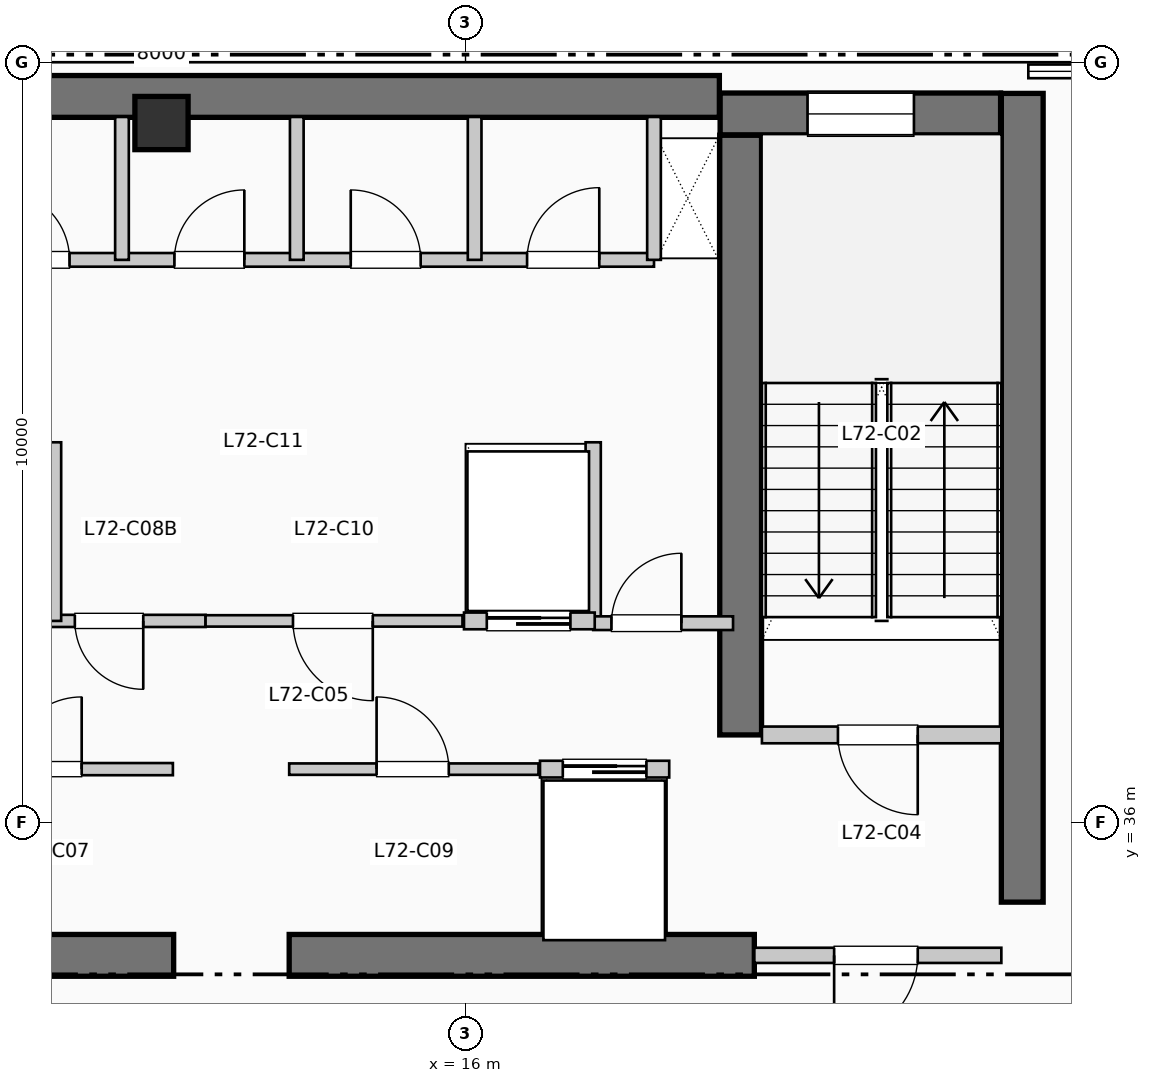
"""IFC4 building model, lengths in metres.
Left out: names, types, materials, properties, quantities, classifications, styles, units other than length and angle.
Written with IfcOpenShell. Run it as: python <this file> out.ifc"""

import sys

from ifc_helpers import new_model, si_unit, direction, frame, frame_2d, origin, origin_2d, place, context, subcontext, project, spatial, rectangle, extrude, element, fill, save


model = new_model("IFC4")
c1 = context("Model", 3, precision=1e-05, world=origin(), true_north=direction((0.0, 1.0)))
c2 = subcontext(c1, "Body", "Model", "MODEL_VIEW")
j1 = project(units=[si_unit("LENGTHUNIT", "METRE"), si_unit("PLANEANGLEUNIT", "RADIAN")], contexts=[c1])
p1 = place(None, origin())
s1 = spatial("IfcSite", under=j1, at=p1, CompositionType="ELEMENT")
p2 = place(p1, origin())
s2 = spatial("IfcBuilding", under=s1, at=p2, CompositionType="ELEMENT")
p3 = place(p2, frame((0.0, 0.0, 296.01)))
s3 = spatial("IfcBuildingStorey", under=s2, at=p3, CompositionType="ELEMENT", Elevation=296.01)
p4 = place(p3, frame((5.36, 45.55, 0.0), z_axis=(0.0, 0.0, 1.0), x_axis=(1.0, 0.0, 0.0)))
e1 = element("IfcWall", 1, at=p4, inside=s3, PredefinedType="SHEAR", context=c2, shape_type="SweptSolid", body=[
    extrude(rectangle(XDim=13.98, YDim=0.55, at=frame_2d((6.99, 0.0))), origin(), (0.0, 0.0, 1.0), 3.96),
])
p5 = place(p3, frame((23.325, 34.95, 0.0), z_axis=(0.0, 0.0, 1.0), x_axis=(0.0, 1.0, 0.0)))
e2 = element("IfcWall", 2, at=p5, inside=s3, PredefinedType="SHEAR", context=c2, shape_type="SweptSolid", body=[
    extrude(rectangle(XDim=10.64, YDim=0.55, at=frame_2d((5.32, 0.0))), origin(), (0.0, 0.0, 1.0), 3.96),
])
p6 = place(p3, frame((1.45, 34.25, 0.0), z_axis=(0.0, 0.0, 1.0), x_axis=(1.0, 0.0, 0.0)))
e3 = element("IfcWall", 3, at=p6, inside=s3, PredefinedType="SHEAR", context=c2, shape_type="SweptSolid", body=[
    extrude(rectangle(XDim=10.71, YDim=0.55, at=frame_2d((5.355, 0.0))), origin(), (0.0, 0.0, 1.0), 3.96),
])
p7 = place(p6, frame((7.25, 0.0, 0.0), z_axis=(0.0, 0.0, 1.0), x_axis=(-1.0, 0.0, 0.0)))
e4 = element("IfcOpeningElement", 4, at=p7, cuts=e3, PredefinedType="OPENING", context=c2, shape_type="SweptSolid", body=[
    extrude(rectangle(XDim=1.1, YDim=2.15, at=frame_2d((0.55, 1.075))), frame((0.0, 0.285, 0.0), z_axis=(0.0, -1.0, 0.0), x_axis=(1.0, 0.0, 0.0)), (0.0, 0.0, 1.0), 0.57),
])
p8 = place(p3, frame((13.68, 34.25, 0.0), z_axis=(0.0, 0.0, 1.0), x_axis=(1.0, 0.0, 0.0)))
e5 = element("IfcWall", 5, at=p8, inside=s3, PredefinedType="SHEAR", context=c2, shape_type="SweptSolid", body=[
    extrude(rectangle(XDim=6.12, YDim=0.55, at=frame_2d((3.06, 0.0))), origin(), (0.0, 0.0, 1.0), 3.96),
])
p9 = place(p3, frame((19.62, 37.15, 0.0), z_axis=(0.0, 0.0, 1.0), x_axis=(0.0, 1.0, 0.0)))
e6 = element("IfcWall", 6, at=p9, inside=s3, PredefinedType="SHEAR", context=c2, shape_type="SweptSolid", body=[
    extrude(rectangle(XDim=7.89, YDim=0.55, at=frame_2d((3.945, 0.0))), origin(), (0.0, 0.0, 1.0), 3.96),
])
p10 = place(p3, frame((19.35, 45.32, 0.0), z_axis=(0.0, 0.0, 1.0), x_axis=(1.0, 0.0, 0.0)))
e7 = element("IfcWall", 7, at=p10, inside=s3, PredefinedType="SHEAR", context=c2, shape_type="SweptSolid", body=[
    extrude(rectangle(XDim=3.69, YDim=0.55, at=frame_2d((1.845, 0.0))), origin(), (0.0, 0.0, 1.0), 3.96),
])
p11 = place(p10, frame((1.15, 0.0, 1.05)))
e8 = element("IfcOpeningElement", 8, at=p11, cuts=e7, PredefinedType="OPENING", context=c2, shape_type="SweptSolid", body=[
    extrude(rectangle(XDim=1.4, YDim=1.8, at=frame_2d((0.7, 0.9))), frame((0.0, 0.285, 0.0), z_axis=(0.0, -1.0, 0.0), x_axis=(1.0, 0.0, 0.0)), (0.0, 0.0, 1.0), 0.57),
])
p12 = place(p3, frame((12.0, 45.2, 0.0), z_axis=(0.0, 0.0, 1.0), x_axis=(1.0, 0.0, 0.0)))
e9 = element("IfcColumn", 9, at=p12, inside=s3, PredefinedType="COLUMN", context=c2, shape_type="SweptSolid", body=[
    extrude(rectangle(XDim=0.7, YDim=0.7, at=origin_2d()), origin(), (0.0, 0.0, 1.0), 3.96),
])
p13 = place(p3, frame((19.9, 37.15, 0.0), z_axis=(0.0, 0.0, 1.0), x_axis=(1.0, 0.0, 0.0)))
e10 = element("IfcWall", 10, at=p13, inside=s3, PredefinedType="PARTITIONING", context=c2, shape_type="SweptSolid", body=[
    extrude(rectangle(XDim=3.15, YDim=0.22, at=frame_2d((1.575, 0.0))), origin(), (0.0, 0.0, 1.0), 3.74),
])
p14 = place(p13, frame((2.05, 0.0, 0.0), z_axis=(0.0, 0.0, 1.0), x_axis=(-1.0, 0.0, 0.0)))
e11 = element("IfcOpeningElement", 11, at=p14, cuts=e10, PredefinedType="OPENING", context=c2, shape_type="SweptSolid", body=[
    extrude(rectangle(XDim=1.05, YDim=2.15, at=frame_2d((0.525, 1.075))), frame((0.0, 0.12, 0.0), z_axis=(0.0, -1.0, 0.0), x_axis=(1.0, 0.0, 0.0)), (0.0, 0.0, 1.0), 0.24),
])
p15 = place(p3, frame((19.8, 34.25, 0.0), z_axis=(0.0, 0.0, 1.0), x_axis=(1.0, 0.0, 0.0)))
e12 = element("IfcWall", 12, at=p15, inside=s3, PredefinedType="PARTITIONING", context=c2, shape_type="SweptSolid", body=[
    extrude(rectangle(XDim=3.25, YDim=0.2, at=frame_2d((1.625, 0.0))), origin(), (0.0, 0.0, 1.0), 3.74),
])
p16 = place(p15, frame((2.15, 0.0, 0.0), z_axis=(0.0, 0.0, 1.0), x_axis=(-1.0, 0.0, 0.0)))
e13 = element("IfcOpeningElement", 13, at=p16, cuts=e12, PredefinedType="OPENING", context=c2, shape_type="SweptSolid", body=[
    extrude(rectangle(XDim=1.1, YDim=2.15, at=frame_2d((0.55, 1.075))), frame((0.0, 0.11, 0.0), z_axis=(0.0, -1.0, 0.0), x_axis=(1.0, 0.0, 0.0)), (0.0, 0.0, 1.0), 0.22),
])
p17 = place(p3, frame((17.68, 38.65, 0.0), z_axis=(0.0, 0.0, 1.0), x_axis=(0.0, 1.0, 0.0)))
e14 = element("IfcWall", 14, at=p17, inside=s3, PredefinedType="PARTITIONING", context=c2, shape_type="SweptSolid", body=[
    extrude(rectangle(XDim=2.35, YDim=0.2, at=frame_2d((1.175, 0.0))), origin(), (0.0, 0.0, 1.0), 3.74),
])
p18 = place(p3, frame((17.68, 38.62, 0.0), z_axis=(0.0, 0.0, 1.0), x_axis=(1.0, 0.0, 0.0)))
e15 = element("IfcWall", 15, at=p18, inside=s3, PredefinedType="PARTITIONING", context=c2, shape_type="SweptSolid", body=[
    extrude(rectangle(XDim=1.84, YDim=0.18, at=frame_2d((0.92, 0.0))), origin(), (0.0, 0.0, 1.0), 3.74),
])
p19 = place(p18, frame((0.24, 0.0, 0.0)))
e16 = element("IfcOpeningElement", 16, at=p19, cuts=e15, PredefinedType="OPENING", context=c2, shape_type="SweptSolid", body=[
    extrude(rectangle(XDim=0.92, YDim=2.1, at=frame_2d((0.46, 1.05))), frame((0.0, 0.1, 0.0), z_axis=(0.0, -1.0, 0.0), x_axis=(1.0, 0.0, 0.0)), (0.0, 0.0, 1.0), 0.2),
])
p20 = place(p3, frame((8.9, 36.7, 0.0), z_axis=(0.0, 0.0, 1.0), x_axis=(1.0, 0.0, 0.0)))
e17 = element("IfcWall", 17, at=p20, inside=s3, PredefinedType="PARTITIONING", context=c2, shape_type="SweptSolid", body=[
    extrude(rectangle(XDim=3.25, YDim=0.16, at=frame_2d((1.625, 0.0))), origin(), (0.0, 0.0, 1.0), 3.74),
])
p21 = place(p20, frame((1.1, 0.0, 0.0)))
e18 = element("IfcOpeningElement", 18, at=p21, cuts=e17, PredefinedType="OPENING", context=c2, shape_type="SweptSolid", body=[
    extrude(rectangle(XDim=0.95, YDim=2.15, at=frame_2d((0.475, 1.075))), frame((0.0, 0.09, 0.0), z_axis=(0.0, -1.0, 0.0), x_axis=(1.0, 0.0, 0.0)), (0.0, 0.0, 1.0), 0.18),
])
p22 = place(p3, frame((9.16, 38.65, 0.0), z_axis=(0.0, 0.0, 1.0), x_axis=(1.0, 0.0, 0.0)))
e19 = element("IfcWall", 19, at=p22, inside=s3, PredefinedType="PARTITIONING", context=c2, shape_type="SweptSolid", body=[
    extrude(rectangle(XDim=3.42, YDim=0.16, at=frame_2d((1.71, 0.0))), origin(), (0.0, 0.0, 1.0), 3.74),
])
p23 = place(p22, frame((1.18, 0.0, 0.0), z_axis=(0.0, 0.0, 1.0), x_axis=(-1.0, 0.0, 0.0)))
e20 = element("IfcOpeningElement", 20, at=p23, cuts=e19, PredefinedType="OPENING", context=c2, shape_type="SweptSolid", body=[
    extrude(rectangle(XDim=0.9, YDim=2.15, at=frame_2d((0.45, 1.075))), frame((0.0, 0.09, 0.0), z_axis=(0.0, -1.0, 0.0), x_axis=(1.0, 0.0, 0.0)), (0.0, 0.0, 1.0), 0.18),
])
p24 = place(p22, frame((2.6, 0.0, 0.0), z_axis=(0.0, 0.0, 1.0), x_axis=(-1.0, 0.0, 0.0)))
e21 = element("IfcOpeningElement", 21, at=p24, cuts=e19, PredefinedType="OPENING", context=c2, shape_type="SweptSolid", body=[
    extrude(rectangle(XDim=0.9, YDim=2.15, at=frame_2d((0.45, 1.075))), frame((0.0, 0.09, 0.0), z_axis=(0.0, -1.0, 0.0), x_axis=(1.0, 0.0, 0.0)), (0.0, 0.0, 1.0), 0.18),
])
p25 = place(p3, frame((10.6, 38.65, 0.0), z_axis=(0.0, 0.0, 1.0), x_axis=(0.0, 1.0, 0.0)))
e22 = element("IfcWall", 22, at=p25, inside=s3, PredefinedType="PARTITIONING", context=c2, shape_type="SweptSolid", body=[
    extrude(rectangle(XDim=2.35, YDim=0.16, at=frame_2d((1.175, 0.0))), origin(), (0.0, 0.0, 1.0), 3.74),
])
p26 = place(p3, frame((13.68, 36.7, 0.0), z_axis=(0.0, 0.0, 1.0), x_axis=(1.0, 0.0, 0.0)))
e23 = element("IfcWall", 23, at=p26, inside=s3, PredefinedType="PARTITIONING", context=c2, shape_type="SweptSolid", body=[
    extrude(rectangle(XDim=3.28, YDim=0.15, at=frame_2d((1.64, 0.0))), origin(), (0.0, 0.0, 1.0), 3.74),
])
p27 = place(p26, frame((1.15, 0.0, 0.0)))
e24 = element("IfcOpeningElement", 24, at=p27, cuts=e23, PredefinedType="OPENING", context=c2, shape_type="SweptSolid", body=[
    extrude(rectangle(XDim=0.95, YDim=2.15, at=frame_2d((0.475, 1.075))), frame((0.0, 0.085, 0.0), z_axis=(0.0, -1.0, 0.0), x_axis=(1.0, 0.0, 0.0)), (0.0, 0.0, 1.0), 0.17),
])
p28 = place(p3, frame((12.58, 38.65, 0.0), z_axis=(0.0, 0.0, 1.0), x_axis=(1.0, 0.0, 0.0)))
e25 = element("IfcWall", 25, at=p28, inside=s3, PredefinedType="PARTITIONING", context=c2, shape_type="SweptSolid", body=[
    extrude(rectangle(XDim=3.38, YDim=0.15, at=frame_2d((1.69, 0.0))), origin(), (0.0, 0.0, 1.0), 3.74),
])
p29 = place(p28, frame((2.2, 0.0, 0.0), z_axis=(0.0, 0.0, 1.0), x_axis=(-1.0, 0.0, 0.0)))
e26 = element("IfcOpeningElement", 26, at=p29, cuts=e25, PredefinedType="OPENING", context=c2, shape_type="SweptSolid", body=[
    extrude(rectangle(XDim=1.05, YDim=2.15, at=frame_2d((0.525, 1.075))), frame((0.0, 0.085, 0.0), z_axis=(0.0, -1.0, 0.0), x_axis=(1.0, 0.0, 0.0)), (0.0, 0.0, 1.0), 0.17),
])
p30 = place(p3, frame((16.98, 36.7, 0.0), z_axis=(0.0, 0.0, 1.0), x_axis=(1.0, 0.0, 0.0)))
e27 = element("IfcWall", 27, at=p30, inside=s3, PredefinedType="PARTITIONING", context=c2, shape_type="SweptSolid", body=[
    extrude(rectangle(XDim=1.7, YDim=0.22, at=frame_2d((0.85, 0.0))), origin(), (0.0, 0.0, 1.0), 3.74),
])
p31 = place(p30, frame((0.3, 0.0, 0.0)))
e28 = element("IfcOpeningElement", 28, at=p31, cuts=e27, PredefinedType="OPENING", context=c2, shape_type="SweptSolid", body=[
    extrude(rectangle(XDim=1.1, YDim=2.2, at=frame_2d((0.55, 1.1))), frame((0.0, 0.12, 0.0), z_axis=(0.0, -1.0, 0.0), x_axis=(1.0, 0.0, 0.0)), (0.0, 0.0, 1.0), 0.24),
])
p32 = place(p3, frame((15.98, 38.65, 0.0), z_axis=(0.0, 0.0, 1.0), x_axis=(1.0, 0.0, 0.0)))
e29 = element("IfcWall", 29, at=p32, inside=s3, PredefinedType="PARTITIONING", context=c2, shape_type="SweptSolid", body=[
    extrude(rectangle(XDim=1.72, YDim=0.22, at=frame_2d((0.86, 0.0))), origin(), (0.0, 0.0, 1.0), 3.74),
])
p33 = place(p32, frame((0.3, 0.0, 0.0)))
e30 = element("IfcOpeningElement", 30, at=p33, cuts=e29, PredefinedType="OPENING", context=c2, shape_type="SweptSolid", body=[
    extrude(rectangle(XDim=1.1, YDim=2.2, at=frame_2d((0.55, 1.1))), frame((0.0, 0.12, 0.0), z_axis=(0.0, -1.0, 0.0), x_axis=(1.0, 0.0, 0.0)), (0.0, 0.0, 1.0), 0.24),
])
p34 = place(p3, frame((9.15, 43.4, 0.0), z_axis=(0.0, 0.0, 1.0), x_axis=(1.0, 0.0, 0.0)))
e31 = element("IfcWall", 31, at=p34, inside=s3, PredefinedType="PLUMBINGWALL", context=c2, shape_type="SweptSolid", body=[
    extrude(rectangle(XDim=9.33, YDim=0.18, at=frame_2d((4.665, 0.0))), origin(), (0.0, 0.0, 1.0), 3.74),
])
p35 = place(p34, frame((0.72, 0.0, 0.0)))
e32 = element("IfcOpeningElement", 32, at=p35, cuts=e31, PredefinedType="OPENING", context=c2, shape_type="SweptSolid", body=[
    extrude(rectangle(XDim=0.92, YDim=2.1, at=frame_2d((0.46, 1.05))), frame((0.0, 0.1, 0.0), z_axis=(0.0, -1.0, 0.0), x_axis=(1.0, 0.0, 0.0)), (0.0, 0.0, 1.0), 0.2),
])
p36 = place(p34, frame((3.02, 0.0, 0.0)))
e33 = element("IfcOpeningElement", 33, at=p36, cuts=e31, PredefinedType="OPENING", context=c2, shape_type="SweptSolid", body=[
    extrude(rectangle(XDim=0.92, YDim=2.1, at=frame_2d((0.46, 1.05))), frame((0.0, 0.1, 0.0), z_axis=(0.0, -1.0, 0.0), x_axis=(1.0, 0.0, 0.0)), (0.0, 0.0, 1.0), 0.2),
])
p37 = place(p34, frame((5.34, 0.0, 0.0)))
e34 = element("IfcOpeningElement", 34, at=p37, cuts=e31, PredefinedType="OPENING", context=c2, shape_type="SweptSolid", body=[
    extrude(rectangle(XDim=0.92, YDim=2.1, at=frame_2d((0.46, 1.05))), frame((0.0, 0.1, 0.0), z_axis=(0.0, -1.0, 0.0), x_axis=(1.0, 0.0, 0.0)), (0.0, 0.0, 1.0), 0.2),
])
p38 = place(p34, frame((7.66, 0.0, 0.0)))
e35 = element("IfcOpeningElement", 35, at=p38, cuts=e31, PredefinedType="OPENING", context=c2, shape_type="SweptSolid", body=[
    extrude(rectangle(XDim=0.95, YDim=2.1, at=frame_2d((0.475, 1.05))), frame((0.0, 0.1, 0.0), z_axis=(0.0, -1.0, 0.0), x_axis=(1.0, 0.0, 0.0)), (0.0, 0.0, 1.0), 0.2),
])
for number, where, z_axis, x_axis in (
    (36, (18.48, 43.4, 0.0), (0.0, 0.0, 1.0), (0.0, 1.0, 0.0)),
    (37, (11.48, 43.4, 0.0), (0.0, 0.0, 1.0), (0.0, 1.0, 0.0)),
    (38, (13.78, 43.4, 0.0), (0.0, 0.0, 1.0), (0.0, 1.0, 0.0)),
    (39, (16.12, 43.4, 0.0), (0.0, 0.0, 1.0), (0.0, 1.0, 0.0)),
):
    element("IfcWall", number, at=place(p3, frame(where, z_axis=z_axis, x_axis=x_axis)), inside=s3, PredefinedType="PLUMBINGWALL", context=c2, shape_type="SweptSolid", body=[
        extrude(rectangle(XDim=1.88, YDim=0.18, at=frame_2d((0.94, 0.0))), origin(), (0.0, 0.0, 1.0), 3.74),
    ])
p39 = place(p11, origin())
e40 = element("IfcWindow", 40, at=p39, inside=s3, PartitioningType="SINGLE_PANEL", PredefinedType="WINDOW", context=c2, shape_type="SweptSolid", body=[
    extrude(rectangle(XDim=1.4, YDim=1.8, at=frame_2d((0.7, 0.9))), frame((0.0, 0.03, 0.0), z_axis=(0.0, -1.0, 0.0), x_axis=(1.0, 0.0, 0.0)), (0.0, 0.0, 1.0), 0.06),
])
fill(e8, e40)
p40 = place(p14, origin())
e41 = element("IfcDoor", 41, at=p40, inside=s3, OperationType="SINGLE_SWING_RIGHT", PredefinedType="DOOR", context=c2, shape_type="SweptSolid", body=[
    extrude(rectangle(XDim=1.05, YDim=2.15, at=frame_2d((0.525, 1.075))), frame((0.0, 0.025, 0.0), z_axis=(0.0, -1.0, 0.0), x_axis=(1.0, 0.0, 0.0)), (0.0, 0.0, 1.0), 0.05),
])
fill(e11, e41)
p41 = place(p16, origin())
e42 = element("IfcDoor", 42, at=p41, inside=s3, OperationType="SINGLE_SWING_LEFT", PredefinedType="DOOR", context=c2, shape_type="SweptSolid", body=[
    extrude(rectangle(XDim=1.1, YDim=2.15, at=frame_2d((0.55, 1.075))), frame((0.0, 0.025, 0.0), z_axis=(0.0, -1.0, 0.0), x_axis=(1.0, 0.0, 0.0)), (0.0, 0.0, 1.0), 0.05),
])
fill(e13, e42)
p42 = place(p19, origin())
e43 = element("IfcDoor", 43, at=p42, inside=s3, OperationType="SINGLE_SWING_RIGHT", PredefinedType="DOOR", context=c2, shape_type="SweptSolid", body=[
    extrude(rectangle(XDim=0.92, YDim=2.1, at=frame_2d((0.46, 1.05))), frame((0.0, 0.025, 0.0), z_axis=(0.0, -1.0, 0.0), x_axis=(1.0, 0.0, 0.0)), (0.0, 0.0, 1.0), 0.05),
])
fill(e16, e43)
p43 = place(p21, origin())
e44 = element("IfcDoor", 44, at=p43, inside=s3, OperationType="SINGLE_SWING_RIGHT", PredefinedType="DOOR", context=c2, shape_type="SweptSolid", body=[
    extrude(rectangle(XDim=0.95, YDim=2.15, at=frame_2d((0.475, 1.075))), frame((0.0, 0.025, 0.0), z_axis=(0.0, -1.0, 0.0), x_axis=(1.0, 0.0, 0.0)), (0.0, 0.0, 1.0), 0.05),
])
fill(e18, e44)
p44 = place(p24, origin())
e45 = element("IfcDoor", 45, at=p44, inside=s3, OperationType="SINGLE_SWING_RIGHT", PredefinedType="DOOR", context=c2, shape_type="SweptSolid", body=[
    extrude(rectangle(XDim=0.9, YDim=2.15, at=frame_2d((0.45, 1.075))), frame((0.0, 0.025, 0.0), z_axis=(0.0, -1.0, 0.0), x_axis=(1.0, 0.0, 0.0)), (0.0, 0.0, 1.0), 0.05),
])
fill(e21, e45)
p45 = place(p27, origin())
e46 = element("IfcDoor", 46, at=p45, inside=s3, OperationType="SINGLE_SWING_LEFT", PredefinedType="DOOR", context=c2, shape_type="SweptSolid", body=[
    extrude(rectangle(XDim=0.95, YDim=2.15, at=frame_2d((0.475, 1.075))), frame((0.0, 0.025, 0.0), z_axis=(0.0, -1.0, 0.0), x_axis=(1.0, 0.0, 0.0)), (0.0, 0.0, 1.0), 0.05),
])
fill(e24, e46)
p46 = place(p29, origin())
e47 = element("IfcDoor", 47, at=p46, inside=s3, OperationType="SINGLE_SWING_RIGHT", PredefinedType="DOOR", context=c2, shape_type="SweptSolid", body=[
    extrude(rectangle(XDim=1.05, YDim=2.15, at=frame_2d((0.525, 1.075))), frame((0.0, 0.025, 0.0), z_axis=(0.0, -1.0, 0.0), x_axis=(1.0, 0.0, 0.0)), (0.0, 0.0, 1.0), 0.05),
])
fill(e26, e47)
p47 = place(p31, origin())
e48 = element("IfcDoor", 48, at=p47, inside=s3, OperationType="SLIDING_TO_LEFT", PredefinedType="DOOR", context=c2, shape_type="SweptSolid", body=[
    extrude(rectangle(XDim=1.1, YDim=2.2, at=frame_2d((0.55, 1.1))), frame((0.0, 0.025, 0.0), z_axis=(0.0, -1.0, 0.0), x_axis=(1.0, 0.0, 0.0)), (0.0, 0.0, 1.0), 0.05),
])
fill(e28, e48)
p48 = place(p33, origin())
e49 = element("IfcDoor", 49, at=p48, inside=s3, OperationType="SLIDING_TO_LEFT", PredefinedType="DOOR", context=c2, shape_type="SweptSolid", body=[
    extrude(rectangle(XDim=1.1, YDim=2.2, at=frame_2d((0.55, 1.1))), frame((0.0, 0.025, 0.0), z_axis=(0.0, -1.0, 0.0), x_axis=(1.0, 0.0, 0.0)), (0.0, 0.0, 1.0), 0.05),
])
fill(e30, e49)
p49 = place(p35, origin())
e50 = element("IfcDoor", 50, at=p49, inside=s3, OperationType="SINGLE_SWING_LEFT", PredefinedType="DOOR", context=c2, shape_type="SweptSolid", body=[
    extrude(rectangle(XDim=0.92, YDim=2.1, at=frame_2d((0.46, 1.05))), frame((0.0, 0.025, 0.0), z_axis=(0.0, -1.0, 0.0), x_axis=(1.0, 0.0, 0.0)), (0.0, 0.0, 1.0), 0.05),
])
fill(e32, e50)
p50 = place(p36, origin())
e51 = element("IfcDoor", 51, at=p50, inside=s3, OperationType="SINGLE_SWING_RIGHT", PredefinedType="DOOR", context=c2, shape_type="SweptSolid", body=[
    extrude(rectangle(XDim=0.92, YDim=2.1, at=frame_2d((0.46, 1.05))), frame((0.0, 0.025, 0.0), z_axis=(0.0, -1.0, 0.0), x_axis=(1.0, 0.0, 0.0)), (0.0, 0.0, 1.0), 0.05),
])
fill(e33, e51)
p51 = place(p37, origin())
e52 = element("IfcDoor", 52, at=p51, inside=s3, OperationType="SINGLE_SWING_LEFT", PredefinedType="DOOR", context=c2, shape_type="SweptSolid", body=[
    extrude(rectangle(XDim=0.92, YDim=2.1, at=frame_2d((0.46, 1.05))), frame((0.0, 0.025, 0.0), z_axis=(0.0, -1.0, 0.0), x_axis=(1.0, 0.0, 0.0)), (0.0, 0.0, 1.0), 0.05),
])
fill(e34, e52)
p52 = place(p38, origin())
e53 = element("IfcDoor", 53, at=p52, inside=s3, OperationType="SINGLE_SWING_RIGHT", PredefinedType="DOOR", context=c2, shape_type="SweptSolid", body=[
    extrude(rectangle(XDim=0.95, YDim=2.1, at=frame_2d((0.475, 1.05))), frame((0.0, 0.025, 0.0), z_axis=(0.0, -1.0, 0.0), x_axis=(1.0, 0.0, 0.0)), (0.0, 0.0, 1.0), 0.05),
])
fill(e35, e53)
save(model, sys.argv[1])
